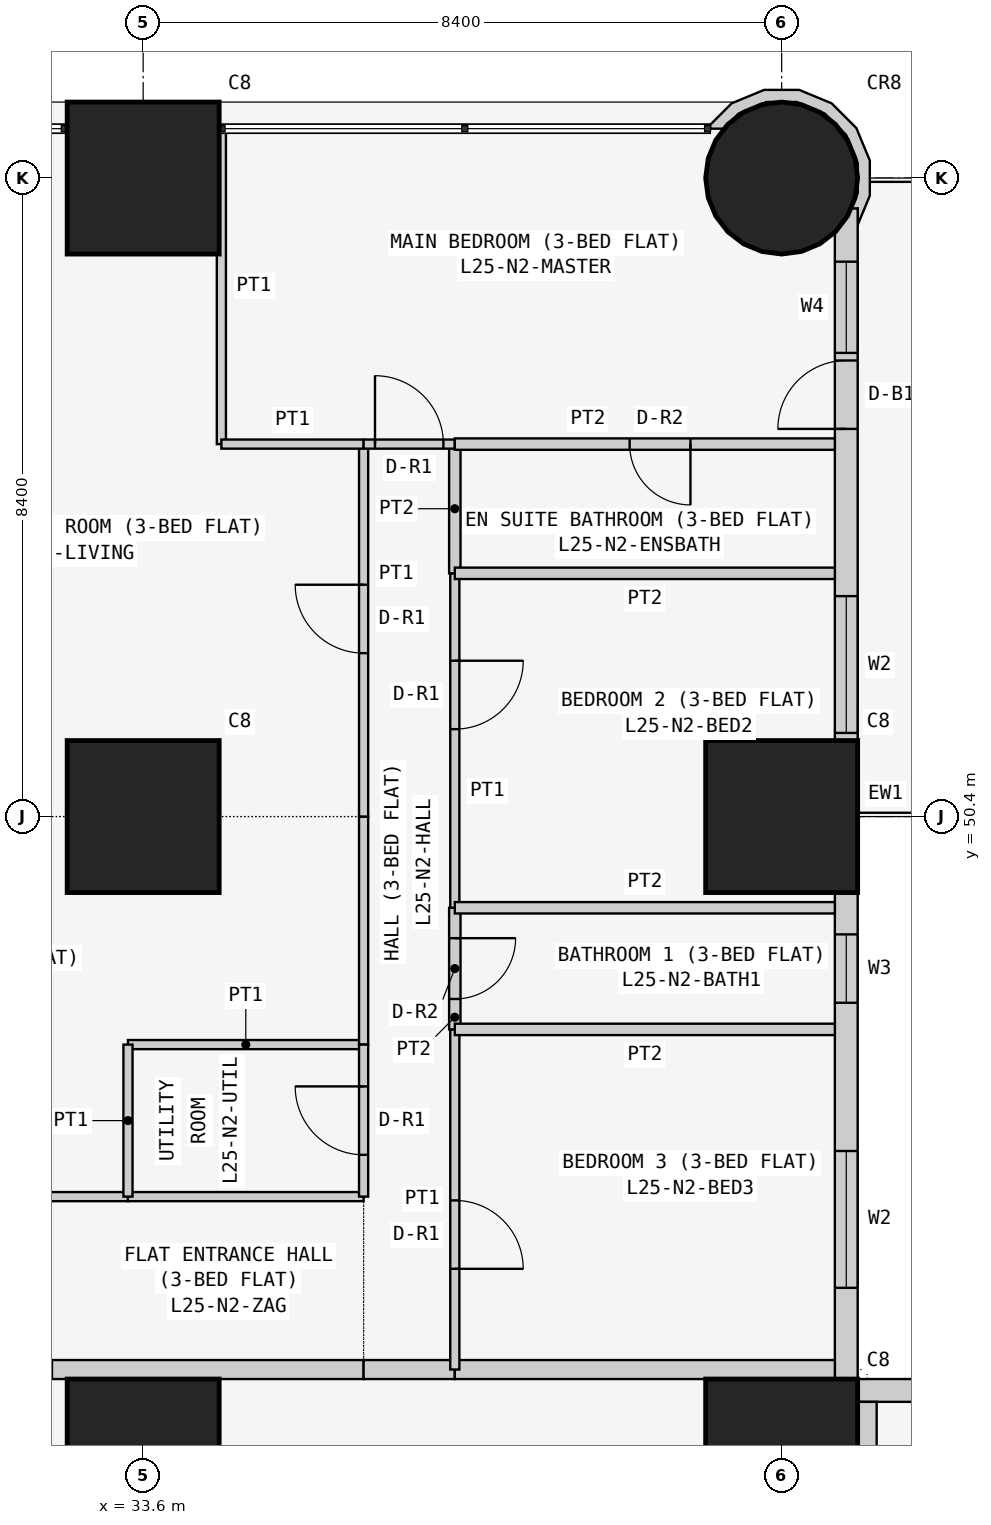
"""IFC4 building model, lengths in metres.
Left out: names, types, materials, properties, quantities, classifications, styles, units other than length and angle.
Written with IfcOpenShell. Run it as: python <this file> out.ifc"""

import sys

from ifc_helpers import new_model, si_unit, direction, frame, frame_2d, origin, origin_2d, place, context, subcontext, project, spatial, polyline, rectangle, circle, outline, extrude, element, fill, save


model = new_model("IFC4")
c1 = context("Model", 3, precision=1e-05, world=origin(), true_north=direction((0.0, 1.0)))
c2 = subcontext(c1, "Body", "Model", "MODEL_VIEW")
j1 = project(units=[si_unit("LENGTHUNIT", "METRE"), si_unit("PLANEANGLEUNIT", "RADIAN")], contexts=[c1])
p1 = place(None, origin())
s1 = spatial("IfcSite", under=j1, at=p1, CompositionType="ELEMENT")
p2 = place(p1, origin())
s2 = spatial("IfcBuilding", under=s1, at=p2, CompositionType="ELEMENT")
p3 = place(p2, frame((0.0, 0.0, 99.3)))
s3 = spatial("IfcBuildingStorey", under=s2, at=p3, CompositionType="ELEMENT", Elevation=99.3)
for number, where, z_axis, x_axis in (
    (1, (33.6, 42.0, 0.0), (0.0, 0.0, 1.0), (1.0, 0.0, 0.0)),
    (2, (33.6, 50.4, 0.0), (0.0, 0.0, 1.0), (1.0, 0.0, 0.0)),
    (3, (33.6, 58.8, 0.0), (0.0, 0.0, 1.0), (1.0, 0.0, 0.0)),
    (4, (42.0, 42.0, 0.0), (0.0, 0.0, 1.0), (1.0, 0.0, 0.0)),
    (5, (42.0, 50.4, 0.0), (0.0, 0.0, 1.0), (1.0, 0.0, 0.0)),
):
    element("IfcColumn", number, at=place(p3, frame(where, z_axis=z_axis, x_axis=x_axis)), inside=s3, PredefinedType="COLUMN", context=c2, shape_type="SweptSolid", body=[
        extrude(rectangle(XDim=2.0, YDim=2.0, at=origin_2d()), origin(), (0.0, 0.0, 1.0), 3.6),
    ])
p4 = place(p3, frame((42.0, 58.8, 0.0), z_axis=(0.0, 0.0, 1.0), x_axis=(1.0, 0.0, 0.0)))
e6 = element("IfcColumn", 6, at=p4, inside=s3, PredefinedType="COLUMN", context=c2, shape_type="SweptSolid", body=[
    extrude(circle(Radius=1.0, at=origin_2d()), origin(), (0.0, 0.0, 1.0), 3.6),
])
p5 = place(p3, frame((58.4, 42.85, 0.0), z_axis=(0.0, 0.0, 1.0), x_axis=(-1.0, 0.0, 0.0)))
e7 = element("IfcWall", 7, at=p5, inside=s3, PredefinedType="SOLIDWALL", context=c2, shape_type="SweptSolid", body=[
    extrude(rectangle(XDim=15.7, YDim=0.3, at=frame_2d((7.85, 0.0))), origin(), (0.0, 0.0, 1.0), 3.35),
])
p6 = place(p5, frame((12.4, 0.0, 0.9)))
e8 = element("IfcOpeningElement", 8, at=p6, cuts=e7, PredefinedType="OPENING", context=c2, shape_type="SweptSolid", body=[
    extrude(rectangle(XDim=1.8, YDim=1.5, at=frame_2d((0.9, 0.75))), frame((0.0, 0.16, 0.0), z_axis=(0.0, -1.0, 0.0), x_axis=(1.0, 0.0, 0.0)), (0.0, 0.0, 1.0), 0.32),
])
p7 = place(p5, frame((9.55, 0.0, 1.5)))
e9 = element("IfcOpeningElement", 9, at=p7, cuts=e7, PredefinedType="OPENING", context=c2, shape_type="SweptSolid", body=[
    extrude(rectangle(XDim=0.9, YDim=0.7, at=frame_2d((0.45, 0.35))), frame((0.0, 0.16, 0.0), z_axis=(0.0, -1.0, 0.0), x_axis=(1.0, 0.0, 0.0)), (0.0, 0.0, 1.0), 0.32),
])
p8 = place(p5, frame((5.1, 0.0, 0.9)))
e10 = element("IfcOpeningElement", 10, at=p8, cuts=e7, PredefinedType="OPENING", context=c2, shape_type="SweptSolid", body=[
    extrude(rectangle(XDim=1.8, YDim=1.5, at=frame_2d((0.9, 0.75))), frame((0.0, 0.16, 0.0), z_axis=(0.0, -1.0, 0.0), x_axis=(1.0, 0.0, 0.0)), (0.0, 0.0, 1.0), 0.32),
])
p9 = place(p5, frame((2.0, 0.0, 0.0)))
e11 = element("IfcOpeningElement", 11, at=p9, cuts=e7, PredefinedType="OPENING", context=c2, shape_type="SweptSolid", body=[
    extrude(rectangle(XDim=0.9, YDim=2.4, at=frame_2d((0.45, 1.2))), frame((0.0, 0.16, 0.0), z_axis=(0.0, -1.0, 0.0), x_axis=(1.0, 0.0, 0.0)), (0.0, 0.0, 1.0), 0.32),
])
p10 = place(p5, frame((0.7, 0.0, 0.9)))
e12 = element("IfcOpeningElement", 12, at=p10, cuts=e7, PredefinedType="OPENING", context=c2, shape_type="SweptSolid", body=[
    extrude(rectangle(XDim=1.2, YDim=1.5, at=frame_2d((0.6, 0.75))), frame((0.0, 0.16, 0.0), z_axis=(0.0, -1.0, 0.0), x_axis=(1.0, 0.0, 0.0)), (0.0, 0.0, 1.0), 0.32),
])
p11 = place(p3, frame((42.85, 43.0, 0.0), z_axis=(0.0, 0.0, 1.0), x_axis=(0.0, 1.0, 0.0)))
e13 = element("IfcWall", 13, at=p11, inside=s3, PredefinedType="SOLIDWALL", context=c2, shape_type="SweptSolid", body=[
    extrude(rectangle(XDim=15.4, YDim=0.3, at=frame_2d((7.7, 0.0))), origin(), (0.0, 0.0, 1.0), 3.35),
])
p12 = place(p11, frame((1.2, 0.0, 0.9)))
e14 = element("IfcOpeningElement", 14, at=p12, cuts=e13, PredefinedType="OPENING", context=c2, shape_type="SweptSolid", body=[
    extrude(rectangle(XDim=1.8, YDim=1.5, at=frame_2d((0.9, 0.75))), frame((0.0, 0.16, 0.0), z_axis=(0.0, -1.0, 0.0), x_axis=(1.0, 0.0, 0.0)), (0.0, 0.0, 1.0), 0.32),
])
p13 = place(p11, frame((4.95, 0.0, 1.5)))
e15 = element("IfcOpeningElement", 15, at=p13, cuts=e13, PredefinedType="OPENING", context=c2, shape_type="SweptSolid", body=[
    extrude(rectangle(XDim=0.9, YDim=0.7, at=frame_2d((0.45, 0.35))), frame((0.0, 0.16, 0.0), z_axis=(0.0, -1.0, 0.0), x_axis=(1.0, 0.0, 0.0)), (0.0, 0.0, 1.0), 0.32),
])
p14 = place(p11, frame((8.5, 0.0, 0.9)))
e16 = element("IfcOpeningElement", 16, at=p14, cuts=e13, PredefinedType="OPENING", context=c2, shape_type="SweptSolid", body=[
    extrude(rectangle(XDim=1.8, YDim=1.5, at=frame_2d((0.9, 0.75))), frame((0.0, 0.16, 0.0), z_axis=(0.0, -1.0, 0.0), x_axis=(1.0, 0.0, 0.0)), (0.0, 0.0, 1.0), 0.32),
])
p15 = place(p11, frame((12.5, 0.0, 0.0)))
e17 = element("IfcOpeningElement", 17, at=p15, cuts=e13, PredefinedType="OPENING", context=c2, shape_type="SweptSolid", body=[
    extrude(rectangle(XDim=0.9, YDim=2.4, at=frame_2d((0.45, 1.2))), frame((0.0, 0.16, 0.0), z_axis=(0.0, -1.0, 0.0), x_axis=(1.0, 0.0, 0.0)), (0.0, 0.0, 1.0), 0.32),
])
p16 = place(p11, frame((13.5, 0.0, 0.9)))
e18 = element("IfcOpeningElement", 18, at=p16, cuts=e13, PredefinedType="OPENING", context=c2, shape_type="SweptSolid", body=[
    extrude(rectangle(XDim=1.2, YDim=1.5, at=frame_2d((0.6, 0.75))), frame((0.0, 0.16, 0.0), z_axis=(0.0, -1.0, 0.0), x_axis=(1.0, 0.0, 0.0)), (0.0, 0.0, 1.0), 0.32),
])
p17 = place(p3, frame((42.919, 58.233, 0.0), z_axis=(0.0, 0.0, 1.0), x_axis=(0.555974394895, 0.831199417842, 0.0)))
e19 = element("IfcWall", 19, at=p17, inside=s3, PredefinedType="SOLIDWALL", context=c2, shape_type="SweptSolid", body=[
    extrude(outline(polyline([(0.414, -0.013), (0.797, 0.243), (1.053, 0.627), (1.143, 1.08), (1.053, 1.532), (0.796, 1.916), (0.413, 2.172), (0.017, 2.251), (-0.023, 2.224), (0.075, 2.077), (0.351, 2.022), (0.682, 1.801), (0.903, 1.47), (0.981, 1.08), (0.903, 0.689), (0.682, 0.358), (0.351, 0.137), (0.126, 0.092), (0.184, 0.026), (0.004, -0.095), (0.414, -0.013)])), origin(), (0.0, 0.0, 1.0), 3.35),
])
p18 = place(p3, frame((29.4, 43.125, 0.0), z_axis=(0.0, 0.0, 1.0), x_axis=(1.0, 0.0, 0.0)))
e20 = element("IfcWall", 20, at=p18, inside=s3, PredefinedType="PARTITIONING", context=c2, shape_type="SweptSolid", body=[
    extrude(rectangle(XDim=7.1, YDim=0.25, at=frame_2d((3.55, 0.0))), origin(), (0.0, 0.0, 1.0), 3.35),
])
p19 = place(p18, frame((2.0, 0.0, 0.0)))
e21 = element("IfcOpeningElement", 21, at=p19, cuts=e20, PredefinedType="OPENING", context=c2, shape_type="SweptSolid", body=[
    extrude(rectangle(XDim=1.0, YDim=2.1, at=frame_2d((0.5, 1.05))), frame((0.0, 0.135, 0.0), z_axis=(0.0, -1.0, 0.0), x_axis=(1.0, 0.0, 0.0)), (0.0, 0.0, 1.0), 0.27),
])
p20 = place(p3, frame((36.5, 43.125, 0.0), z_axis=(0.0, 0.0, 1.0), x_axis=(1.0, 0.0, 0.0)))
e22 = element("IfcWall", 22, at=p20, inside=s3, PredefinedType="PARTITIONING", context=c2, shape_type="SweptSolid", body=[
    extrude(rectangle(XDim=1.2, YDim=0.25, at=frame_2d((0.6, 0.0))), origin(), (0.0, 0.0, 1.0), 3.35),
])
for number, where, z_axis, x_axis in (
    (23, (37.7, 43.125, 0.0), (0.0, 0.0, 1.0), (1.0, 0.0, 0.0)),
    (24, (43.125, 42.7, 0.0), (0.0, 0.0, 1.0), (0.0, -1.0, 0.0)),
):
    element("IfcWall", number, at=place(p3, frame(where, z_axis=z_axis, x_axis=x_axis)), inside=s3, PredefinedType="PARTITIONING", context=c2, shape_type="SweptSolid", body=[
        extrude(rectangle(XDim=5.0, YDim=0.25, at=frame_2d((2.5, 0.0))), origin(), (0.0, 0.0, 1.0), 3.35),
    ])
p21 = place(p3, frame((29.4, 45.4, 0.0), z_axis=(0.0, 0.0, 1.0), x_axis=(1.0, 0.0, 0.0)))
e25 = element("IfcWall", 25, at=p21, inside=s3, PredefinedType="PARTITIONING", context=c2, shape_type="SweptSolid", body=[
    extrude(rectangle(XDim=4.0, YDim=0.12, at=frame_2d((2.0, 0.0))), origin(), (0.0, 0.0, 1.0), 3.35),
])
p22 = place(p21, frame((1.05, 0.0, 0.0)))
e26 = element("IfcOpeningElement", 26, at=p22, cuts=e25, PredefinedType="OPENING", context=c2, shape_type="SweptSolid", body=[
    extrude(rectangle(XDim=0.9, YDim=2.1, at=frame_2d((0.45, 1.05))), frame((0.0, 0.07, 0.0), z_axis=(0.0, -1.0, 0.0), x_axis=(1.0, 0.0, 0.0)), (0.0, 0.0, 1.0), 0.14),
])
for number, where, z_axis, x_axis in (
    (27, (33.4, 45.4, 0.0), (0.0, 0.0, 1.0), (1.0, 0.0, 0.0)),
    (28, (36.5, 47.4, 0.0), (0.0, 0.0, 1.0), (-1.0, 0.0, 0.0)),
):
    element("IfcWall", number, at=place(p3, frame(where, z_axis=z_axis, x_axis=x_axis)), inside=s3, PredefinedType="PARTITIONING", context=c2, shape_type="SweptSolid", body=[
        extrude(rectangle(XDim=3.1, YDim=0.12, at=frame_2d((1.55, 0.0))), origin(), (0.0, 0.0, 1.0), 3.35),
    ])
p23 = place(p3, frame((33.4, 47.4, 0.0), z_axis=(0.0, 0.0, 1.0), x_axis=(0.0, -1.0, 0.0)))
e29 = element("IfcWall", 29, at=p23, inside=s3, PredefinedType="PARTITIONING", context=c2, shape_type="SweptSolid", body=[
    extrude(rectangle(XDim=2.0, YDim=0.12, at=frame_2d((1.0, 0.0))), origin(), (0.0, 0.0, 1.0), 3.35),
])
p24 = place(p3, frame((36.5, 50.4, 0.0), z_axis=(0.0, 0.0, 1.0), x_axis=(0.0, -1.0, 0.0)))
e30 = element("IfcWall", 30, at=p24, inside=s3, PredefinedType="PARTITIONING", context=c2, shape_type="SweptSolid", body=[
    extrude(rectangle(XDim=3.0, YDim=0.12, at=frame_2d((1.5, 0.0))), origin(), (0.0, 0.0, 1.0), 3.35),
])
p25 = place(p3, frame((36.5, 47.4, 0.0), z_axis=(0.0, 0.0, 1.0), x_axis=(0.0, -1.0, 0.0)))
e31 = element("IfcWall", 31, at=p25, inside=s3, PredefinedType="PARTITIONING", context=c2, shape_type="SweptSolid", body=[
    extrude(rectangle(XDim=2.0, YDim=0.12, at=frame_2d((1.0, 0.0))), origin(), (0.0, 0.0, 1.0), 3.35),
])
p26 = place(p25, frame((0.55, 0.0, 0.0)))
e32 = element("IfcOpeningElement", 32, at=p26, cuts=e31, PredefinedType="OPENING", context=c2, shape_type="SweptSolid", body=[
    extrude(rectangle(XDim=0.9, YDim=2.1, at=frame_2d((0.45, 1.05))), frame((0.0, 0.07, 0.0), z_axis=(0.0, -1.0, 0.0), x_axis=(1.0, 0.0, 0.0)), (0.0, 0.0, 1.0), 0.14),
])
p27 = place(p3, frame((36.5, 55.3, 0.0), z_axis=(0.0, 0.0, 1.0), x_axis=(0.0, -1.0, 0.0)))
e33 = element("IfcWall", 33, at=p27, inside=s3, PredefinedType="PARTITIONING", context=c2, shape_type="SweptSolid", body=[
    extrude(rectangle(XDim=4.9, YDim=0.12, at=frame_2d((2.45, 0.0))), origin(), (0.0, 0.0, 1.0), 3.35),
])
p28 = place(p27, frame((1.85, 0.0, 0.0)))
e34 = element("IfcOpeningElement", 34, at=p28, cuts=e33, PredefinedType="OPENING", context=c2, shape_type="SweptSolid", body=[
    extrude(rectangle(XDim=0.9, YDim=2.1, at=frame_2d((0.45, 1.05))), frame((0.0, 0.07, 0.0), z_axis=(0.0, -1.0, 0.0), x_axis=(1.0, 0.0, 0.0)), (0.0, 0.0, 1.0), 0.14),
])
p29 = place(p3, frame((34.629, 59.45, 0.0), z_axis=(0.0, 0.0, 1.0), x_axis=(0.0, -1.0, 0.0)))
e35 = element("IfcWall", 35, at=p29, inside=s3, PredefinedType="PARTITIONING", context=c2, shape_type="SweptSolid", body=[
    extrude(rectangle(XDim=4.15, YDim=0.12, at=frame_2d((2.075, 0.0))), origin(), (0.0, 0.0, 1.0), 3.35),
])
p30 = place(p3, frame((34.629, 55.3, 0.0), z_axis=(0.0, 0.0, 1.0), x_axis=(1.0, 0.0, 0.0)))
e36 = element("IfcWall", 36, at=p30, inside=s3, PredefinedType="PARTITIONING", context=c2, shape_type="SweptSolid", body=[
    extrude(rectangle(XDim=1.871, YDim=0.12, at=frame_2d((0.936, 0.0))), origin(), (0.0, 0.0, 1.0), 3.35),
])
p31 = place(p3, frame((37.7, 47.6, 0.0), z_axis=(0.0, 0.0, 1.0), x_axis=(0.0, -1.0, 0.0)))
e37 = element("IfcWall", 37, at=p31, inside=s3, PredefinedType="PARTITIONING", context=c2, shape_type="SweptSolid", body=[
    extrude(rectangle(XDim=4.475, YDim=0.12, at=frame_2d((2.238, 0.0))), origin(), (0.0, 0.0, 1.0), 2.667),
])
p32 = place(p31, frame((2.25, 0.0, 0.0)))
e38 = element("IfcOpeningElement", 38, at=p32, cuts=e37, PredefinedType="OPENING", context=c2, shape_type="SweptSolid", body=[
    extrude(rectangle(XDim=0.9, YDim=2.1, at=frame_2d((0.45, 1.05))), frame((0.0, 0.07, 0.0), z_axis=(0.0, -1.0, 0.0), x_axis=(1.0, 0.0, 0.0)), (0.0, 0.0, 1.0), 0.14),
])
p33 = place(p3, frame((37.7, 49.2, 0.0), z_axis=(0.0, 0.0, 1.0), x_axis=(0.0, -1.0, 0.0)))
e39 = element("IfcWall", 39, at=p33, inside=s3, PredefinedType="PARTITIONING", context=c2, shape_type="SweptSolid", body=[
    extrude(rectangle(XDim=1.6, YDim=0.15, at=frame_2d((0.8, 0.0))), origin(), (0.0, 0.0, 1.0), 2.667),
])
p34 = place(p33, frame((0.4, 0.0, 0.0)))
e40 = element("IfcOpeningElement", 40, at=p34, cuts=e39, PredefinedType="OPENING", context=c2, shape_type="SweptSolid", body=[
    extrude(rectangle(XDim=0.8, YDim=2.1, at=frame_2d((0.4, 1.05))), frame((0.0, 0.085, 0.0), z_axis=(0.0, -1.0, 0.0), x_axis=(1.0, 0.0, 0.0)), (0.0, 0.0, 1.0), 0.17),
])
p35 = place(p3, frame((37.7, 53.6, 0.0), z_axis=(0.0, 0.0, 1.0), x_axis=(0.0, -1.0, 0.0)))
e41 = element("IfcWall", 41, at=p35, inside=s3, PredefinedType="PARTITIONING", context=c2, shape_type="SweptSolid", body=[
    extrude(rectangle(XDim=4.4, YDim=0.12, at=frame_2d((2.2, 0.0))), origin(), (0.0, 0.0, 1.0), 2.667),
])
p36 = place(p35, frame((1.15, 0.0, 0.0)))
e42 = element("IfcOpeningElement", 42, at=p36, cuts=e41, PredefinedType="OPENING", context=c2, shape_type="SweptSolid", body=[
    extrude(rectangle(XDim=0.9, YDim=2.1, at=frame_2d((0.45, 1.05))), frame((0.0, 0.07, 0.0), z_axis=(0.0, -1.0, 0.0), x_axis=(1.0, 0.0, 0.0)), (0.0, 0.0, 1.0), 0.14),
])
p37 = place(p3, frame((37.7, 55.3, 0.0), z_axis=(0.0, 0.0, 1.0), x_axis=(0.0, -1.0, 0.0)))
e43 = element("IfcWall", 43, at=p37, inside=s3, PredefinedType="PARTITIONING", context=c2, shape_type="SweptSolid", body=[
    extrude(rectangle(XDim=1.7, YDim=0.15, at=frame_2d((0.85, 0.0))), origin(), (0.0, 0.0, 1.0), 2.667),
])
p38 = place(p3, frame((36.5, 55.3, 0.0), z_axis=(0.0, 0.0, 1.0), x_axis=(1.0, 0.0, 0.0)))
e44 = element("IfcWall", 44, at=p38, inside=s3, PredefinedType="PARTITIONING", context=c2, shape_type="SweptSolid", body=[
    extrude(rectangle(XDim=1.2, YDim=0.12, at=frame_2d((0.6, 0.0))), origin(), (0.0, 0.0, 1.0), 3.35),
])
p39 = place(p38, frame((0.15, 0.0, 0.0)))
e45 = element("IfcOpeningElement", 45, at=p39, cuts=e44, PredefinedType="OPENING", context=c2, shape_type="SweptSolid", body=[
    extrude(rectangle(XDim=0.9, YDim=2.1, at=frame_2d((0.45, 1.05))), frame((0.0, 0.07, 0.0), z_axis=(0.0, -1.0, 0.0), x_axis=(1.0, 0.0, 0.0)), (0.0, 0.0, 1.0), 0.14),
])
for number, where, z_axis, x_axis in (
    (46, (37.7, 47.6, 0.0), (0.0, 0.0, 1.0), (1.0, 0.0, 0.0)),
    (47, (37.7, 49.2, 0.0), (0.0, 0.0, 1.0), (1.0, 0.0, 0.0)),
    (48, (37.7, 53.6, 0.0), (0.0, 0.0, 1.0), (1.0, 0.0, 0.0)),
):
    element("IfcWall", number, at=place(p3, frame(where, z_axis=z_axis, x_axis=x_axis)), inside=s3, PredefinedType="PARTITIONING", context=c2, shape_type="SweptSolid", body=[
        extrude(rectangle(XDim=5.0, YDim=0.15, at=frame_2d((2.5, 0.0))), origin(), (0.0, 0.0, 1.0), 3.35),
    ])
p40 = place(p3, frame((37.7, 55.3, 0.0), z_axis=(0.0, 0.0, 1.0), x_axis=(1.0, 0.0, 0.0)))
e49 = element("IfcWall", 49, at=p40, inside=s3, PredefinedType="PARTITIONING", context=c2, shape_type="SweptSolid", body=[
    extrude(rectangle(XDim=5.0, YDim=0.15, at=frame_2d((2.5, 0.0))), origin(), (0.0, 0.0, 1.0), 3.35),
])
p41 = place(p40, frame((2.3, 0.0, 0.0)))
e50 = element("IfcOpeningElement", 50, at=p41, cuts=e49, PredefinedType="OPENING", context=c2, shape_type="SweptSolid", body=[
    extrude(rectangle(XDim=0.8, YDim=2.1, at=frame_2d((0.4, 1.05))), frame((0.0, 0.085, 0.0), z_axis=(0.0, -1.0, 0.0), x_axis=(1.0, 0.0, 0.0)), (0.0, 0.0, 1.0), 0.17),
])
p42 = place(p12, origin())
e51 = element("IfcWindow", 51, at=p42, inside=s3, PartitioningType="SINGLE_PANEL", PredefinedType="WINDOW", context=c2, shape_type="SweptSolid", body=[
    extrude(rectangle(XDim=1.8, YDim=1.5, at=frame_2d((0.9, 0.75))), frame((0.0, 0.03, 0.0), z_axis=(0.0, -1.0, 0.0), x_axis=(1.0, 0.0, 0.0)), (0.0, 0.0, 1.0), 0.06),
])
fill(e14, e51)
p43 = place(p13, origin())
e52 = element("IfcWindow", 52, at=p43, inside=s3, PartitioningType="SINGLE_PANEL", PredefinedType="WINDOW", context=c2, shape_type="SweptSolid", body=[
    extrude(rectangle(XDim=0.9, YDim=0.7, at=frame_2d((0.45, 0.35))), frame((0.0, 0.03, 0.0), z_axis=(0.0, -1.0, 0.0), x_axis=(1.0, 0.0, 0.0)), (0.0, 0.0, 1.0), 0.06),
])
fill(e15, e52)
p44 = place(p14, origin())
e53 = element("IfcWindow", 53, at=p44, inside=s3, PartitioningType="SINGLE_PANEL", PredefinedType="WINDOW", context=c2, shape_type="SweptSolid", body=[
    extrude(rectangle(XDim=1.8, YDim=1.5, at=frame_2d((0.9, 0.75))), frame((0.0, 0.03, 0.0), z_axis=(0.0, -1.0, 0.0), x_axis=(1.0, 0.0, 0.0)), (0.0, 0.0, 1.0), 0.06),
])
fill(e16, e53)
p45 = place(p15, origin())
e54 = element("IfcDoor", 54, at=p45, inside=s3, OperationType="SINGLE_SWING_LEFT", PredefinedType="DOOR", context=c2, shape_type="SweptSolid", body=[
    extrude(rectangle(XDim=0.9, YDim=2.4, at=frame_2d((0.45, 1.2))), frame((0.0, 0.025, 0.0), z_axis=(0.0, -1.0, 0.0), x_axis=(1.0, 0.0, 0.0)), (0.0, 0.0, 1.0), 0.05),
])
fill(e17, e54)
p46 = place(p16, origin())
e55 = element("IfcWindow", 55, at=p46, inside=s3, PartitioningType="SINGLE_PANEL", PredefinedType="WINDOW", context=c2, shape_type="SweptSolid", body=[
    extrude(rectangle(XDim=1.2, YDim=1.5, at=frame_2d((0.6, 0.75))), frame((0.0, 0.03, 0.0), z_axis=(0.0, -1.0, 0.0), x_axis=(1.0, 0.0, 0.0)), (0.0, 0.0, 1.0), 0.06),
])
fill(e18, e55)
p47 = place(p26, frame((0.9, 0.0, 0.0), z_axis=(0.0, 0.0, 1.0), x_axis=(-1.0, 0.0, 0.0)))
e56 = element("IfcDoor", 56, at=p47, inside=s3, OperationType="SINGLE_SWING_RIGHT", PredefinedType="DOOR", context=c2, shape_type="SweptSolid", body=[
    extrude(rectangle(XDim=0.9, YDim=2.1, at=frame_2d((0.45, 1.05))), frame((0.0, 0.025, 0.0), z_axis=(0.0, -1.0, 0.0), x_axis=(1.0, 0.0, 0.0)), (0.0, 0.0, 1.0), 0.05),
])
fill(e32, e56)
p48 = place(p28, frame((0.9, 0.0, 0.0), z_axis=(0.0, 0.0, 1.0), x_axis=(-1.0, 0.0, 0.0)))
e57 = element("IfcDoor", 57, at=p48, inside=s3, OperationType="SINGLE_SWING_RIGHT", PredefinedType="DOOR", context=c2, shape_type="SweptSolid", body=[
    extrude(rectangle(XDim=0.9, YDim=2.1, at=frame_2d((0.45, 1.05))), frame((0.0, 0.025, 0.0), z_axis=(0.0, -1.0, 0.0), x_axis=(1.0, 0.0, 0.0)), (0.0, 0.0, 1.0), 0.05),
])
fill(e34, e57)
p49 = place(p32, origin())
e58 = element("IfcDoor", 58, at=p49, inside=s3, OperationType="SINGLE_SWING_RIGHT", PredefinedType="DOOR", context=c2, shape_type="SweptSolid", body=[
    extrude(rectangle(XDim=0.9, YDim=2.1, at=frame_2d((0.45, 1.05))), frame((0.0, 0.025, 0.0), z_axis=(0.0, -1.0, 0.0), x_axis=(1.0, 0.0, 0.0)), (0.0, 0.0, 1.0), 0.05),
])
fill(e38, e58)
p50 = place(p34, origin())
e59 = element("IfcDoor", 59, at=p50, inside=s3, OperationType="SINGLE_SWING_LEFT", PredefinedType="DOOR", context=c2, shape_type="SweptSolid", body=[
    extrude(rectangle(XDim=0.8, YDim=2.1, at=frame_2d((0.4, 1.05))), frame((0.0, 0.025, 0.0), z_axis=(0.0, -1.0, 0.0), x_axis=(1.0, 0.0, 0.0)), (0.0, 0.0, 1.0), 0.05),
])
fill(e40, e59)
p51 = place(p36, origin())
e60 = element("IfcDoor", 60, at=p51, inside=s3, OperationType="SINGLE_SWING_LEFT", PredefinedType="DOOR", context=c2, shape_type="SweptSolid", body=[
    extrude(rectangle(XDim=0.9, YDim=2.1, at=frame_2d((0.45, 1.05))), frame((0.0, 0.025, 0.0), z_axis=(0.0, -1.0, 0.0), x_axis=(1.0, 0.0, 0.0)), (0.0, 0.0, 1.0), 0.05),
])
fill(e42, e60)
p52 = place(p39, origin())
e61 = element("IfcDoor", 61, at=p52, inside=s3, OperationType="SINGLE_SWING_LEFT", PredefinedType="DOOR", context=c2, shape_type="SweptSolid", body=[
    extrude(rectangle(XDim=0.9, YDim=2.1, at=frame_2d((0.45, 1.05))), frame((0.0, 0.025, 0.0), z_axis=(0.0, -1.0, 0.0), x_axis=(1.0, 0.0, 0.0)), (0.0, 0.0, 1.0), 0.05),
])
fill(e45, e61)
p53 = place(p41, frame((0.8, 0.0, 0.0), z_axis=(0.0, 0.0, 1.0), x_axis=(-1.0, 0.0, 0.0)))
e62 = element("IfcDoor", 62, at=p53, inside=s3, OperationType="SINGLE_SWING_LEFT", PredefinedType="DOOR", context=c2, shape_type="SweptSolid", body=[
    extrude(rectangle(XDim=0.8, YDim=2.1, at=frame_2d((0.4, 1.05))), frame((0.0, 0.025, 0.0), z_axis=(0.0, -1.0, 0.0), x_axis=(1.0, 0.0, 0.0)), (0.0, 0.0, 1.0), 0.05),
])
fill(e50, e62)
save(model, sys.argv[1])
